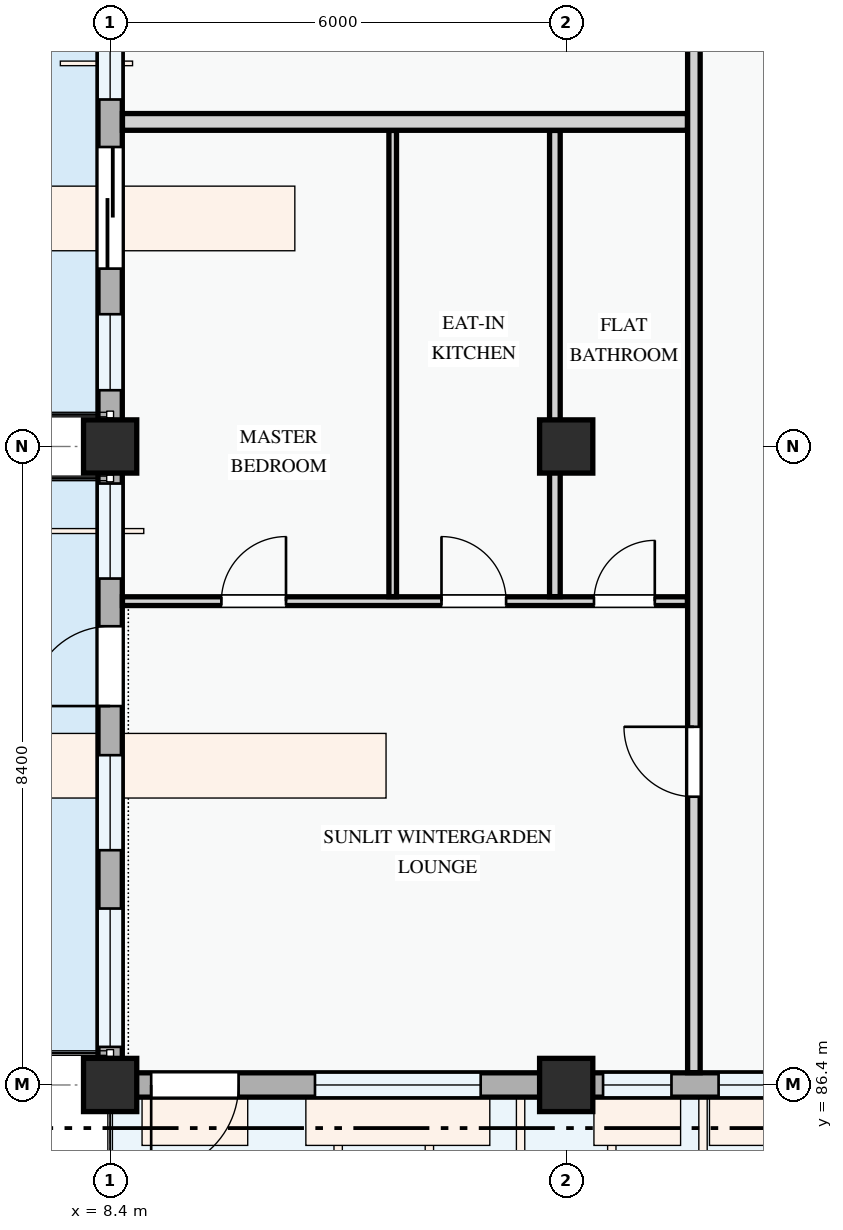
"""IFC4 building model, lengths in metres.
Left out: names, types, materials, properties, quantities, classifications, styles, units other than length and angle.
Written with IfcOpenShell. Run it as: python <this file> out.ifc"""

import sys

from ifc_helpers import new_model, si_unit, direction, frame, frame_2d, origin, origin_2d, place, context, subcontext, project, spatial, rectangle, extrude, element, fill, save


model = new_model("IFC4")
c1 = context("Model", 3, precision=1e-05, world=origin(), true_north=direction((0.0, 1.0)))
c2 = subcontext(c1, "Body", "Model", "MODEL_VIEW")
j1 = project(units=[si_unit("LENGTHUNIT", "METRE"), si_unit("PLANEANGLEUNIT", "RADIAN")], contexts=[c1])
p1 = place(None, origin())
s1 = spatial("IfcSite", under=j1, at=p1, CompositionType="ELEMENT")
p2 = place(p1, origin())
s2 = spatial("IfcBuilding", under=s1, at=p2, CompositionType="ELEMENT")
p3 = place(p2, frame((0.0, 0.0, 21.3)))
s3 = spatial("IfcBuildingStorey", under=s2, at=p3, CompositionType="ELEMENT", Elevation=21.3)
for number, where, z_axis, x_axis in (
    (1, (8.4, 86.4, 0.0), (0.0, 0.0, 1.0), (1.0, 0.0, 0.0)),
    (2, (8.4, 94.8, 0.0), (0.0, 0.0, 1.0), (1.0, 0.0, 0.0)),
    (3, (14.4, 86.4, 0.0), (0.0, 0.0, 1.0), (1.0, 0.0, 0.0)),
    (4, (14.4, 94.8, 0.0), (0.0, 0.0, 1.0), (1.0, 0.0, 0.0)),
):
    element("IfcColumn", number, at=place(p3, frame(where, z_axis=z_axis, x_axis=x_axis)), inside=s3, PredefinedType="COLUMN", context=c2, shape_type="SweptSolid", body=[
        extrude(rectangle(XDim=0.7, YDim=0.7, at=origin_2d()), origin(), (0.0, 0.0, 1.0), 3.3),
    ])
p4 = place(p3, frame((8.4, 100.8, 0.0), z_axis=(0.0, 0.0, 1.0), x_axis=(0.0, -1.0, 0.0)))
e5 = element("IfcWall", 5, at=p4, inside=s3, PredefinedType="STANDARD", context=c2, shape_type="SweptSolid", body=[
    extrude(rectangle(XDim=6.0, YDim=0.32, at=frame_2d((3.0, 0.0))), origin(), (0.0, 0.0, 1.0), 2.445),
])
p5 = place(p4, frame((2.06, 0.0, 0.0)))
e6 = element("IfcOpeningElement", 6, at=p5, cuts=e5, PredefinedType="OPENING", context=c2, shape_type="SweptSolid", body=[
    extrude(rectangle(XDim=1.6, YDim=2.2, at=frame_2d((0.8, 1.1))), frame((0.0, 0.17, 0.0), z_axis=(0.0, -1.0, 0.0), x_axis=(1.0, 0.0, 0.0)), (0.0, 0.0, 1.0), 0.34),
])
p6 = place(p4, frame((0.485, 0.0, 0.78)))
e7 = element("IfcOpeningElement", 7, at=p6, cuts=e5, PredefinedType="OPENING", context=c2, shape_type="SweptSolid", body=[
    extrude(rectangle(XDim=0.95, YDim=1.15, at=frame_2d((0.475, 0.575))), frame((0.0, 0.17, 0.0), z_axis=(0.0, -1.0, 0.0), x_axis=(1.0, 0.0, 0.0)), (0.0, 0.0, 1.0), 0.34),
])
p7 = place(p4, frame((4.26, 0.0, 0.78)))
e8 = element("IfcOpeningElement", 8, at=p7, cuts=e5, PredefinedType="OPENING", context=c2, shape_type="SweptSolid", body=[
    extrude(rectangle(XDim=1.0, YDim=1.25, at=frame_2d((0.5, 0.625))), frame((0.0, 0.17, 0.0), z_axis=(0.0, -1.0, 0.0), x_axis=(1.0, 0.0, 0.0)), (0.0, 0.0, 1.0), 0.34),
])
p8 = place(p3, frame((8.4, 94.8, 0.0), z_axis=(0.0, 0.0, 1.0), x_axis=(0.0, -1.0, 0.0)))
e9 = element("IfcWall", 9, at=p8, inside=s3, PredefinedType="STANDARD", context=c2, shape_type="SweptSolid", body=[
    extrude(rectangle(XDim=8.4, YDim=0.32, at=frame_2d((4.2, 0.0))), origin(), (0.0, 0.0, 1.0), 2.345),
])
p9 = place(p8, frame((2.365, 0.0, 0.0)))
e10 = element("IfcOpeningElement", 10, at=p9, cuts=e9, PredefinedType="OPENING", context=c2, shape_type="SweptSolid", body=[
    extrude(rectangle(XDim=1.05, YDim=2.15, at=frame_2d((0.525, 1.075))), frame((0.0, 0.17, 0.0), z_axis=(0.0, -1.0, 0.0), x_axis=(1.0, 0.0, 0.0)), (0.0, 0.0, 1.0), 0.34),
])
p10 = place(p8, frame((0.488, 0.0, 0.78)))
e11 = element("IfcOpeningElement", 11, at=p10, cuts=e9, PredefinedType="OPENING", context=c2, shape_type="SweptSolid", body=[
    extrude(rectangle(XDim=1.25, YDim=1.3, at=frame_2d((0.625, 0.65))), frame((0.0, 0.17, 0.0), z_axis=(0.0, -1.0, 0.0), x_axis=(1.0, 0.0, 0.0)), (0.0, 0.0, 1.0), 0.34),
])
p11 = place(p8, frame((4.061, 0.0, 0.78)))
e12 = element("IfcOpeningElement", 12, at=p11, cuts=e9, PredefinedType="OPENING", context=c2, shape_type="SweptSolid", body=[
    extrude(rectangle(XDim=1.25, YDim=1.45, at=frame_2d((0.625, 0.725))), frame((0.0, 0.17, 0.0), z_axis=(0.0, -1.0, 0.0), x_axis=(1.0, 0.0, 0.0)), (0.0, 0.0, 1.0), 0.34),
])
p12 = place(p8, frame((6.079, 0.0, 0.78)))
e13 = element("IfcOpeningElement", 13, at=p12, cuts=e9, PredefinedType="OPENING", context=c2, shape_type="SweptSolid", body=[
    extrude(rectangle(XDim=1.82, YDim=1.46, at=frame_2d((0.91, 0.73))), frame((0.0, 0.17, 0.0), z_axis=(0.0, -1.0, 0.0), x_axis=(1.0, 0.0, 0.0)), (0.0, 0.0, 1.0), 0.34),
])
p13 = place(p3, frame((8.4, 86.4, 0.0), z_axis=(0.0, 0.0, 1.0), x_axis=(1.0, 0.0, 0.0)))
e14 = element("IfcWall", 14, at=p13, inside=s3, PredefinedType="STANDARD", context=c2, shape_type="SweptSolid", body=[
    extrude(rectangle(XDim=6.0, YDim=0.32, at=frame_2d((3.0, 0.0))), origin(), (0.0, 0.0, 1.0), 2.475),
])
p14 = place(p13, frame((0.54, 0.0, 0.0)))
e15 = element("IfcOpeningElement", 15, at=p14, cuts=e14, PredefinedType="OPENING", context=c2, shape_type="SweptSolid", body=[
    extrude(rectangle(XDim=1.15, YDim=2.15, at=frame_2d((0.575, 1.075))), frame((0.0, 0.17, 0.0), z_axis=(0.0, -1.0, 0.0), x_axis=(1.0, 0.0, 0.0)), (0.0, 0.0, 1.0), 0.34),
])
p15 = place(p13, frame((2.695, 0.0, 0.78)))
e16 = element("IfcOpeningElement", 16, at=p15, cuts=e14, PredefinedType="OPENING", context=c2, shape_type="SweptSolid", body=[
    extrude(rectangle(XDim=2.18, YDim=1.48, at=frame_2d((1.09, 0.74))), frame((0.0, 0.17, 0.0), z_axis=(0.0, -1.0, 0.0), x_axis=(1.0, 0.0, 0.0)), (0.0, 0.0, 1.0), 0.34),
])
p16 = place(p3, frame((14.4, 86.4, 0.0), z_axis=(0.0, 0.0, 1.0), x_axis=(1.0, 0.0, 0.0)))
e17 = element("IfcWall", 17, at=p16, inside=s3, PredefinedType="STANDARD", context=c2, shape_type="SweptSolid", body=[
    extrude(rectangle(XDim=8.4, YDim=0.32, at=frame_2d((4.2, 0.0))), origin(), (0.0, 0.0, 1.0), 2.375),
])
p17 = place(p16, frame((3.93, 0.0, 0.0)))
e18 = element("IfcOpeningElement", 18, at=p17, cuts=e17, PredefinedType="OPENING", context=c2, shape_type="SweptSolid", body=[
    extrude(rectangle(XDim=1.35, YDim=2.2, at=frame_2d((0.675, 1.1))), frame((0.0, 0.17, 0.0), z_axis=(0.0, -1.0, 0.0), x_axis=(1.0, 0.0, 0.0)), (0.0, 0.0, 1.0), 0.34),
])
p18 = place(p16, frame((6.18, 0.0, 0.78)))
e19 = element("IfcOpeningElement", 19, at=p18, cuts=e17, PredefinedType="OPENING", context=c2, shape_type="SweptSolid", body=[
    extrude(rectangle(XDim=1.2, YDim=1.35, at=frame_2d((0.6, 0.675))), frame((0.0, 0.17, 0.0), z_axis=(0.0, -1.0, 0.0), x_axis=(1.0, 0.0, 0.0)), (0.0, 0.0, 1.0), 0.34),
])
p19 = place(p16, frame((0.485, 0.0, 0.78)))
e20 = element("IfcOpeningElement", 20, at=p19, cuts=e17, PredefinedType="OPENING", context=c2, shape_type="SweptSolid", body=[
    extrude(rectangle(XDim=0.9, YDim=1.2, at=frame_2d((0.45, 0.6))), frame((0.0, 0.17, 0.0), z_axis=(0.0, -1.0, 0.0), x_axis=(1.0, 0.0, 0.0)), (0.0, 0.0, 1.0), 0.34),
])
p20 = place(p16, frame((2.005, 0.0, 0.78)))
e21 = element("IfcOpeningElement", 21, at=p20, cuts=e17, PredefinedType="OPENING", context=c2, shape_type="SweptSolid", body=[
    extrude(rectangle(XDim=1.25, YDim=1.45, at=frame_2d((0.625, 0.725))), frame((0.0, 0.17, 0.0), z_axis=(0.0, -1.0, 0.0), x_axis=(1.0, 0.0, 0.0)), (0.0, 0.0, 1.0), 0.34),
])
p21 = place(p3, frame((8.562, 92.765, 0.0), z_axis=(0.0, 0.0, 1.0), x_axis=(1.0, 0.0, 0.0)))
e22 = element("IfcWall", 22, at=p21, inside=s3, PredefinedType="PARTITIONING", context=c2, shape_type="SweptSolid", body=[
    extrude(rectangle(XDim=7.434, YDim=0.115, at=frame_2d((3.717, 0.0))), origin(), (0.0, 0.0, 1.0), 3.0),
])
p22 = place(p21, frame((1.302, 0.0, 0.0)))
e23 = element("IfcOpeningElement", 23, at=p22, cuts=e22, PredefinedType="OPENING", context=c2, shape_type="SweptSolid", body=[
    extrude(rectangle(XDim=0.85, YDim=2.1, at=frame_2d((0.425, 1.05))), frame((0.0, 0.067, 0.0), z_axis=(0.0, -1.0, 0.0), x_axis=(1.0, 0.0, 0.0)), (0.0, 0.0, 1.0), 0.135),
])
p23 = place(p21, frame((4.198, 0.0, 0.0)))
e24 = element("IfcOpeningElement", 24, at=p23, cuts=e22, PredefinedType="OPENING", context=c2, shape_type="SweptSolid", body=[
    extrude(rectangle(XDim=0.85, YDim=2.1, at=frame_2d((0.425, 1.05))), frame((0.0, 0.067, 0.0), z_axis=(0.0, -1.0, 0.0), x_axis=(1.0, 0.0, 0.0)), (0.0, 0.0, 1.0), 0.135),
])
p24 = place(p21, frame((6.204, 0.0, 0.0)))
e25 = element("IfcOpeningElement", 25, at=p24, cuts=e22, PredefinedType="OPENING", context=c2, shape_type="SweptSolid", body=[
    extrude(rectangle(XDim=0.8, YDim=2.1, at=frame_2d((0.4, 1.05))), frame((0.0, 0.067, 0.0), z_axis=(0.0, -1.0, 0.0), x_axis=(1.0, 0.0, 0.0)), (0.0, 0.0, 1.0), 0.135),
])
p25 = place(p3, frame((12.118, 92.824, 0.0), z_axis=(0.0, 0.0, 1.0), x_axis=(0.0, 1.0, 0.0)))
e26 = element("IfcWall", 26, at=p25, inside=s3, PredefinedType="PARTITIONING", context=c2, shape_type="SweptSolid", body=[
    extrude(rectangle(XDim=6.134, YDim=0.1, at=frame_2d((3.067, 0.0))), origin(), (0.0, 0.0, 1.0), 3.0),
])
p26 = place(p3, frame((14.251, 92.824, 0.0), z_axis=(0.0, 0.0, 1.0), x_axis=(0.0, 1.0, 0.0)))
e27 = element("IfcWall", 27, at=p26, inside=s3, PredefinedType="PARTITIONING", context=c2, shape_type="SweptSolid", body=[
    extrude(rectangle(XDim=6.134, YDim=0.14, at=frame_2d((3.067, 0.0))), origin(), (0.0, 0.0, 1.0), 2.425),
])
p27 = place(p3, frame((8.562, 99.07, 0.0), z_axis=(0.0, 0.0, 1.0), x_axis=(1.0, 0.0, 0.0)))
e28 = element("IfcWall", 28, at=p27, inside=s3, PredefinedType="PARTITIONING", context=c2, shape_type="SweptSolid", body=[
    extrude(rectangle(XDim=7.434, YDim=0.22, at=frame_2d((3.717, 0.0))), origin(), (0.0, 0.0, 1.0), 3.0),
])
p28 = place(p3, frame((16.08, 86.562, 0.0), z_axis=(0.0, 0.0, 1.0), x_axis=(0.0, 1.0, 0.0)))
e29 = element("IfcWall", 29, at=p28, inside=s3, PredefinedType="PARTITIONING", context=c2, shape_type="SweptSolid", body=[
    extrude(rectangle(XDim=22.778, YDim=0.165, at=frame_2d((11.389, 0.0))), origin(), (0.0, 0.0, 1.0), 3.0),
])
p29 = place(p28, frame((3.63, 0.0, 0.0)))
e30 = element("IfcOpeningElement", 30, at=p29, cuts=e29, PredefinedType="OPENING", context=c2, shape_type="SweptSolid", body=[
    extrude(rectangle(XDim=0.92, YDim=2.1, at=frame_2d((0.46, 1.05))), frame((0.0, 0.093, 0.0), z_axis=(0.0, -1.0, 0.0), x_axis=(1.0, 0.0, 0.0)), (0.0, 0.0, 1.0), 0.185),
])
p30 = place(p28, frame((16.433, 0.0, 0.0)))
e31 = element("IfcOpeningElement", 31, at=p30, cuts=e29, PredefinedType="OPENING", context=c2, shape_type="SweptSolid", body=[
    extrude(rectangle(XDim=0.92, YDim=2.1, at=frame_2d((0.46, 1.05))), frame((0.0, 0.093, 0.0), z_axis=(0.0, -1.0, 0.0), x_axis=(1.0, 0.0, 0.0)), (0.0, 0.0, 1.0), 0.185),
])
p31 = place(p5, frame((1.6, 0.0, 0.0), z_axis=(0.0, 0.0, 1.0), x_axis=(-1.0, 0.0, 0.0)))
e32 = element("IfcDoor", 32, at=p31, inside=s3, OperationType="SLIDING_TO_LEFT", PredefinedType="DOOR", context=c2, shape_type="SweptSolid", body=[
    extrude(rectangle(XDim=1.6, YDim=2.2, at=frame_2d((0.8, 1.1))), frame((0.0, 0.025, 0.0), z_axis=(0.0, -1.0, 0.0), x_axis=(1.0, 0.0, 0.0)), (0.0, 0.0, 1.0), 0.05),
])
fill(e6, e32)
p32 = place(p6, origin())
e33 = element("IfcWindow", 33, at=p32, inside=s3, PartitioningType="SINGLE_PANEL", PredefinedType="WINDOW", context=c2, shape_type="SweptSolid", body=[
    extrude(rectangle(XDim=0.95, YDim=1.15, at=frame_2d((0.475, 0.575))), frame((0.0, 0.03, 0.0), z_axis=(0.0, -1.0, 0.0), x_axis=(1.0, 0.0, 0.0)), (0.0, 0.0, 1.0), 0.06),
])
fill(e7, e33)
p33 = place(p7, origin())
e34 = element("IfcWindow", 34, at=p33, inside=s3, PartitioningType="SINGLE_PANEL", PredefinedType="WINDOW", context=c2, shape_type="SweptSolid", body=[
    extrude(rectangle(XDim=1.0, YDim=1.25, at=frame_2d((0.5, 0.625))), frame((0.0, 0.03, 0.0), z_axis=(0.0, -1.0, 0.0), x_axis=(1.0, 0.0, 0.0)), (0.0, 0.0, 1.0), 0.06),
])
fill(e8, e34)
p34 = place(p9, frame((1.05, 0.0, 0.0), z_axis=(0.0, 0.0, 1.0), x_axis=(-1.0, 0.0, 0.0)))
e35 = element("IfcDoor", 35, at=p34, inside=s3, OperationType="SINGLE_SWING_LEFT", PredefinedType="DOOR", context=c2, shape_type="SweptSolid", body=[
    extrude(rectangle(XDim=1.05, YDim=2.15, at=frame_2d((0.525, 1.075))), frame((0.0, 0.025, 0.0), z_axis=(0.0, -1.0, 0.0), x_axis=(1.0, 0.0, 0.0)), (0.0, 0.0, 1.0), 0.05),
])
fill(e10, e35)
p35 = place(p10, origin())
e36 = element("IfcWindow", 36, at=p35, inside=s3, PartitioningType="SINGLE_PANEL", PredefinedType="WINDOW", context=c2, shape_type="SweptSolid", body=[
    extrude(rectangle(XDim=1.25, YDim=1.3, at=frame_2d((0.625, 0.65))), frame((0.0, 0.03, 0.0), z_axis=(0.0, -1.0, 0.0), x_axis=(1.0, 0.0, 0.0)), (0.0, 0.0, 1.0), 0.06),
])
fill(e11, e36)
p36 = place(p11, origin())
e37 = element("IfcWindow", 37, at=p36, inside=s3, PartitioningType="SINGLE_PANEL", PredefinedType="WINDOW", context=c2, shape_type="SweptSolid", body=[
    extrude(rectangle(XDim=1.25, YDim=1.45, at=frame_2d((0.625, 0.725))), frame((0.0, 0.03, 0.0), z_axis=(0.0, -1.0, 0.0), x_axis=(1.0, 0.0, 0.0)), (0.0, 0.0, 1.0), 0.06),
])
fill(e12, e37)
p37 = place(p12, origin())
e38 = element("IfcWindow", 38, at=p37, inside=s3, PartitioningType="DOUBLE_PANEL_VERTICAL", PredefinedType="WINDOW", context=c2, shape_type="SweptSolid", body=[
    extrude(rectangle(XDim=1.82, YDim=1.46, at=frame_2d((0.91, 0.73))), frame((0.0, 0.03, 0.0), z_axis=(0.0, -1.0, 0.0), x_axis=(1.0, 0.0, 0.0)), (0.0, 0.0, 1.0), 0.06),
])
fill(e13, e38)
p38 = place(p14, frame((1.15, 0.0, 0.0), z_axis=(0.0, 0.0, 1.0), x_axis=(-1.0, 0.0, 0.0)))
e39 = element("IfcDoor", 39, at=p38, inside=s3, OperationType="SINGLE_SWING_RIGHT", PredefinedType="DOOR", context=c2, shape_type="SweptSolid", body=[
    extrude(rectangle(XDim=1.15, YDim=2.15, at=frame_2d((0.575, 1.075))), frame((0.0, 0.025, 0.0), z_axis=(0.0, -1.0, 0.0), x_axis=(1.0, 0.0, 0.0)), (0.0, 0.0, 1.0), 0.05),
])
fill(e15, e39)
p39 = place(p15, origin())
e40 = element("IfcWindow", 40, at=p39, inside=s3, PartitioningType="DOUBLE_PANEL_VERTICAL", PredefinedType="WINDOW", context=c2, shape_type="SweptSolid", body=[
    extrude(rectangle(XDim=2.18, YDim=1.48, at=frame_2d((1.09, 0.74))), frame((0.0, 0.03, 0.0), z_axis=(0.0, -1.0, 0.0), x_axis=(1.0, 0.0, 0.0)), (0.0, 0.0, 1.0), 0.06),
])
fill(e16, e40)
p40 = place(p19, origin())
e41 = element("IfcWindow", 41, at=p40, inside=s3, PartitioningType="SINGLE_PANEL", PredefinedType="WINDOW", context=c2, shape_type="SweptSolid", body=[
    extrude(rectangle(XDim=0.9, YDim=1.2, at=frame_2d((0.45, 0.6))), frame((0.0, 0.03, 0.0), z_axis=(0.0, -1.0, 0.0), x_axis=(1.0, 0.0, 0.0)), (0.0, 0.0, 1.0), 0.06),
])
fill(e20, e41)
p41 = place(p20, origin())
e42 = element("IfcWindow", 42, at=p41, inside=s3, PartitioningType="SINGLE_PANEL", PredefinedType="WINDOW", context=c2, shape_type="SweptSolid", body=[
    extrude(rectangle(XDim=1.25, YDim=1.45, at=frame_2d((0.625, 0.725))), frame((0.0, 0.03, 0.0), z_axis=(0.0, -1.0, 0.0), x_axis=(1.0, 0.0, 0.0)), (0.0, 0.0, 1.0), 0.06),
])
fill(e21, e42)
p42 = place(p22, origin())
e43 = element("IfcDoor", 43, at=p42, inside=s3, OperationType="SINGLE_SWING_RIGHT", PredefinedType="DOOR", context=c2, shape_type="SweptSolid", body=[
    extrude(rectangle(XDim=0.85, YDim=2.1, at=frame_2d((0.425, 1.05))), frame((0.0, 0.025, 0.0), z_axis=(0.0, -1.0, 0.0), x_axis=(1.0, 0.0, 0.0)), (0.0, 0.0, 1.0), 0.05),
])
fill(e23, e43)
p43 = place(p23, origin())
e44 = element("IfcDoor", 44, at=p43, inside=s3, OperationType="SINGLE_SWING_LEFT", PredefinedType="DOOR", context=c2, shape_type="SweptSolid", body=[
    extrude(rectangle(XDim=0.85, YDim=2.1, at=frame_2d((0.425, 1.05))), frame((0.0, 0.025, 0.0), z_axis=(0.0, -1.0, 0.0), x_axis=(1.0, 0.0, 0.0)), (0.0, 0.0, 1.0), 0.05),
])
fill(e24, e44)
p44 = place(p24, origin())
e45 = element("IfcDoor", 45, at=p44, inside=s3, OperationType="SINGLE_SWING_RIGHT", PredefinedType="DOOR", context=c2, shape_type="SweptSolid", body=[
    extrude(rectangle(XDim=0.8, YDim=2.1, at=frame_2d((0.4, 1.05))), frame((0.0, 0.025, 0.0), z_axis=(0.0, -1.0, 0.0), x_axis=(1.0, 0.0, 0.0)), (0.0, 0.0, 1.0), 0.05),
])
fill(e25, e45)
p45 = place(p29, origin())
e46 = element("IfcDoor", 46, at=p45, inside=s3, OperationType="SINGLE_SWING_RIGHT", PredefinedType="DOOR", context=c2, shape_type="SweptSolid", body=[
    extrude(rectangle(XDim=0.92, YDim=2.1, at=frame_2d((0.46, 1.05))), frame((0.0, 0.025, 0.0), z_axis=(0.0, -1.0, 0.0), x_axis=(1.0, 0.0, 0.0)), (0.0, 0.0, 1.0), 0.05),
])
fill(e30, e46)
save(model, sys.argv[1])
